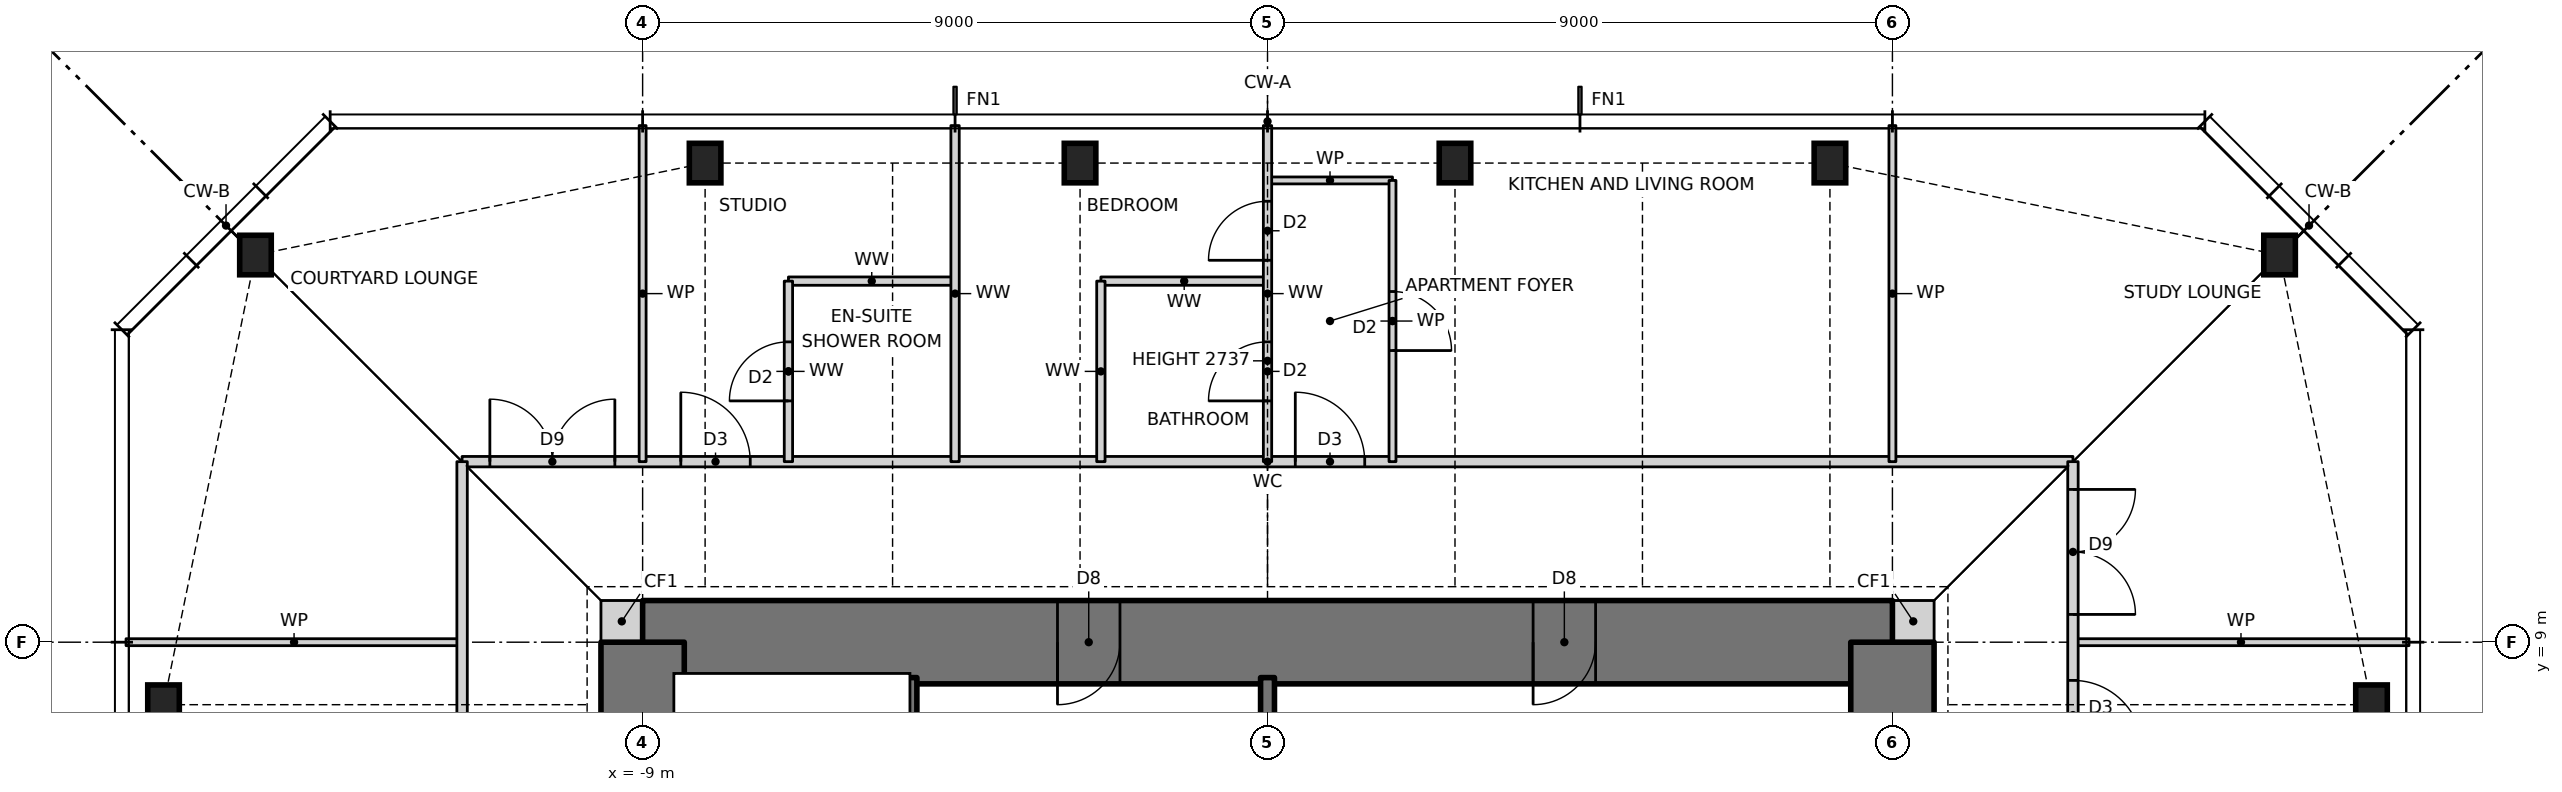
"""IFC4 building model, lengths in metres.
Left out: names, types, materials, properties, quantities, classifications, styles, units other than length and angle.
Written with IfcOpenShell. Run it as: python <this file> out.ifc"""

import sys

from ifc_helpers import new_model, si_unit, direction, frame, frame_2d, origin, origin_2d, place, context, subcontext, project, spatial, rectangle, i_section, extrude, element, fill, save


model = new_model("IFC4")
c1 = context("Model", 3, precision=1e-05, world=origin(), true_north=direction((0.0, 1.0)))
c2 = subcontext(c1, "Body", "Model", "MODEL_VIEW")
j1 = project(units=[si_unit("LENGTHUNIT", "METRE"), si_unit("PLANEANGLEUNIT", "RADIAN")], contexts=[c1])
p1 = place(None, origin())
s1 = spatial("IfcSite", under=j1, at=p1, CompositionType="ELEMENT")
p2 = place(p1, origin())
s2 = spatial("IfcBuilding", under=s1, at=p2, CompositionType="ELEMENT")
p3 = place(p2, frame((0.0, 0.0, 232.5)))
s3 = spatial("IfcBuildingStorey", under=s2, at=p3, CompositionType="ELEMENT", Elevation=232.5)
for number, where, z_axis, x_axis in (
    (1, (15.9, 8.1, 0.0), (0.0, 0.0, 1.0), (1.0, 0.0, 0.0)),
    (2, (14.576, 14.576, 0.0), (0.0, 0.0, 1.0), (1.0, 0.0, 0.0)),
    (3, (8.1, 15.9, 0.0), (0.0, 0.0, 1.0), (1.0, 0.0, 0.0)),
    (4, (2.7, 15.9, 0.0), (0.0, 0.0, 1.0), (1.0, 0.0, 0.0)),
    (5, (-2.7, 15.9, 0.0), (0.0, 0.0, 1.0), (1.0, 0.0, 0.0)),
    (6, (-8.1, 15.9, 0.0), (0.0, 0.0, 1.0), (1.0, 0.0, 0.0)),
    (7, (-14.576, 14.576, 0.0), (0.0, 0.0, 1.0), (1.0, 0.0, 0.0)),
    (8, (-15.9, 8.1, 0.0), (0.0, 0.0, 1.0), (1.0, 0.0, 0.0)),
):
    element("IfcColumn", number, at=place(p3, frame(where, z_axis=z_axis, x_axis=x_axis)), inside=s3, PredefinedType="COLUMN", context=c2, shape_type="SweptSolid", body=[
        extrude(i_section(OverallWidth=0.455, OverallDepth=0.569, WebThickness=0.078, FlangeThickness=0.125, at=origin_2d()), origin(), (0.0, 0.0, 1.0), 3.5),
    ])
for number, where, z_axis, x_axis in (
    (9, (9.0, 9.3, 0.0), (0.0, 0.0, 1.0), (1.0, 0.0, 0.0)),
    (10, (-9.6, 9.3, 0.0), (0.0, 0.0, 1.0), (1.0, 0.0, 0.0)),
):
    element("IfcWall", number, at=place(p3, frame(where, z_axis=z_axis, x_axis=x_axis)), inside=s3, PredefinedType="SOLIDWALL", context=c2, shape_type="SweptSolid", body=[
        extrude(rectangle(XDim=0.6, YDim=0.6, at=frame_2d((0.3, 0.0))), origin(), (0.0, 0.0, 1.0), 3.5),
    ])
p4 = place(p3, frame((9.0, 9.0, 0.0), z_axis=(0.0, 0.0, 1.0), x_axis=(-1.0, 0.0, 0.0)))
e11 = element("IfcWall", 11, at=p4, inside=s3, PredefinedType="SHEAR", context=c2, shape_type="SweptSolid", body=[
    extrude(rectangle(XDim=18.0, YDim=1.2, at=frame_2d((9.0, 0.0))), origin(), (0.0, 0.0, 1.0), 3.5),
])
p5 = place(p4, frame((11.125, 0.0, 0.0)))
e12 = element("IfcOpeningElement", 12, at=p5, cuts=e11, PredefinedType="OPENING", context=c2, shape_type="SweptSolid", body=[
    extrude(rectangle(XDim=0.9, YDim=2.1, at=frame_2d((0.45, 1.05))), frame((0.0, 0.61, 0.0), z_axis=(0.0, -1.0, 0.0), x_axis=(1.0, 0.0, 0.0)), (0.0, 0.0, 1.0), 1.22),
])
p6 = place(p4, frame((4.275, 0.0, 0.0)))
e13 = element("IfcOpeningElement", 13, at=p6, cuts=e11, PredefinedType="OPENING", context=c2, shape_type="SweptSolid", body=[
    extrude(rectangle(XDim=0.9, YDim=2.1, at=frame_2d((0.45, 1.05))), frame((0.0, 0.61, 0.0), z_axis=(0.0, -1.0, 0.0), x_axis=(1.0, 0.0, 0.0)), (0.0, 0.0, 1.0), 1.22),
])
p7 = place(p3, frame((9.0, -9.0, 0.0), z_axis=(0.0, 0.0, 1.0), x_axis=(0.0, 1.0, 0.0)))
e14 = element("IfcWall", 14, at=p7, inside=s3, PredefinedType="SHEAR", context=c2, shape_type="SweptSolid", body=[
    extrude(rectangle(XDim=18.0, YDim=1.2, at=frame_2d((9.0, 0.0))), origin(), (0.0, 0.0, 1.0), 3.5),
])
p8 = place(p7, frame((8.5, 0.0, 0.0)))
e15 = element("IfcOpeningElement", 15, at=p8, cuts=e14, PredefinedType="OPENING", context=c2, shape_type="SweptSolid", body=[
    extrude(rectangle(XDim=1.0, YDim=2.1, at=frame_2d((0.5, 1.05))), frame((0.0, 0.61, 0.0), z_axis=(0.0, -1.0, 0.0), x_axis=(1.0, 0.0, 0.0)), (0.0, 0.0, 1.0), 1.22),
])
p9 = place(p3, frame((-9.0, 9.0, 0.0), z_axis=(0.0, 0.0, 1.0), x_axis=(0.0, -1.0, 0.0)))
e16 = element("IfcWall", 16, at=p9, inside=s3, PredefinedType="SHEAR", context=c2, shape_type="SweptSolid", body=[
    extrude(rectangle(XDim=18.0, YDim=1.2, at=frame_2d((9.0, 0.0))), origin(), (0.0, 0.0, 1.0), 3.5),
])
p10 = place(p9, frame((8.5, 0.0, 0.0)))
e17 = element("IfcOpeningElement", 17, at=p10, cuts=e16, PredefinedType="OPENING", context=c2, shape_type="SweptSolid", body=[
    extrude(rectangle(XDim=1.0, YDim=2.1, at=frame_2d((0.5, 1.05))), frame((0.0, 0.61, 0.0), z_axis=(0.0, -1.0, 0.0), x_axis=(1.0, 0.0, 0.0)), (0.0, 0.0, 1.0), 1.22),
])
for number, where, z_axis, x_axis in (
    (18, (-16.44, 9.0, 0.0), (0.0, 0.0, 1.0), (1.0, 0.0, 0.0)),
    (19, (11.6, 9.0, 0.0), (0.0, 0.0, 1.0), (1.0, 0.0, 0.0)),
):
    element("IfcWall", number, at=place(p3, frame(where, z_axis=z_axis, x_axis=x_axis)), inside=s3, PredefinedType="PARTITIONING", context=c2, shape_type="SweptSolid", body=[
        extrude(rectangle(XDim=4.84, YDim=0.1, at=frame_2d((2.42, 0.0))), origin(), (0.0, 0.0, 1.0), 3.27),
    ])
p11 = place(p3, frame((-11.6, 11.6, 0.0), z_axis=(0.0, 0.0, 1.0), x_axis=(1.0, 0.0, 0.0)))
e20 = element("IfcWall", 20, at=p11, inside=s3, PredefinedType="PARTITIONING", context=c2, shape_type="SweptSolid", body=[
    extrude(rectangle(XDim=23.2, YDim=0.15, at=frame_2d((11.6, 0.0))), origin(), (0.0, 0.0, 1.0), 3.27),
])
p12 = place(p11, frame((12.0, 0.0, 0.0)))
e21 = element("IfcOpeningElement", 21, at=p12, cuts=e20, PredefinedType="OPENING", context=c2, shape_type="SweptSolid", body=[
    extrude(rectangle(XDim=1.0, YDim=2.1, at=frame_2d((0.5, 1.05))), frame((0.0, 0.085, 0.0), z_axis=(0.0, -1.0, 0.0), x_axis=(1.0, 0.0, 0.0)), (0.0, 0.0, 1.0), 0.17),
])
p13 = place(p11, frame((3.15, 0.0, 0.0)))
e22 = element("IfcOpeningElement", 22, at=p13, cuts=e20, PredefinedType="OPENING", context=c2, shape_type="SweptSolid", body=[
    extrude(rectangle(XDim=1.0, YDim=2.1, at=frame_2d((0.5, 1.05))), frame((0.0, 0.085, 0.0), z_axis=(0.0, -1.0, 0.0), x_axis=(1.0, 0.0, 0.0)), (0.0, 0.0, 1.0), 0.17),
])
p14 = place(p11, frame((0.4, 0.0, 0.0)))
e23 = element("IfcOpeningElement", 23, at=p14, cuts=e20, PredefinedType="OPENING", context=c2, shape_type="SweptSolid", body=[
    extrude(rectangle(XDim=1.8, YDim=2.1, at=frame_2d((0.9, 1.05))), frame((0.0, 0.085, 0.0), z_axis=(0.0, -1.0, 0.0), x_axis=(1.0, 0.0, 0.0)), (0.0, 0.0, 1.0), 0.17),
])
for number, where, z_axis, x_axis in (
    (24, (-6.9, 14.2, 0.0), (0.0, 0.0, 1.0), (1.0, 0.0, 0.0)),
    (25, (-2.4, 14.2, 0.0), (0.0, 0.0, 1.0), (1.0, 0.0, 0.0)),
):
    element("IfcWall", number, at=place(p3, frame(where, z_axis=z_axis, x_axis=x_axis)), inside=s3, PredefinedType="PARTITIONING", context=c2, shape_type="SweptSolid", body=[
        extrude(rectangle(XDim=2.4, YDim=0.12, at=frame_2d((1.2, 0.0))), origin(), (0.0, 0.0, 1.0), 3.27),
    ])
p15 = place(p3, frame((0.0, 15.65, 0.0), z_axis=(0.0, 0.0, 1.0), x_axis=(1.0, 0.0, 0.0)))
e26 = element("IfcWall", 26, at=p15, inside=s3, PredefinedType="PARTITIONING", context=c2, shape_type="SweptSolid", body=[
    extrude(rectangle(XDim=1.8, YDim=0.1, at=frame_2d((0.9, 0.0))), origin(), (0.0, 0.0, 1.0), 3.27),
])
p16 = place(p3, frame((11.6, -12.1, 0.0), z_axis=(0.0, 0.0, 1.0), x_axis=(0.0, 1.0, 0.0)))
e27 = element("IfcWall", 27, at=p16, inside=s3, PredefinedType="PARTITIONING", context=c2, shape_type="SweptSolid", body=[
    extrude(rectangle(XDim=23.7, YDim=0.15, at=frame_2d((11.85, 0.0))), origin(), (0.0, 0.0, 1.0), 3.27),
])
p17 = place(p16, frame((10.7, 0.0, 0.0)))
e28 = element("IfcOpeningElement", 28, at=p17, cuts=e27, PredefinedType="OPENING", context=c2, shape_type="SweptSolid", body=[
    extrude(rectangle(XDim=1.0, YDim=2.1, at=frame_2d((0.5, 1.05))), frame((0.0, 0.085, 0.0), z_axis=(0.0, -1.0, 0.0), x_axis=(1.0, 0.0, 0.0)), (0.0, 0.0, 1.0), 0.17),
])
p18 = place(p16, frame((19.55, 0.0, 0.0)))
e29 = element("IfcOpeningElement", 29, at=p18, cuts=e27, PredefinedType="OPENING", context=c2, shape_type="SweptSolid", body=[
    extrude(rectangle(XDim=1.0, YDim=2.1, at=frame_2d((0.5, 1.05))), frame((0.0, 0.085, 0.0), z_axis=(0.0, -1.0, 0.0), x_axis=(1.0, 0.0, 0.0)), (0.0, 0.0, 1.0), 0.17),
])
p19 = place(p16, frame((21.5, 0.0, 0.0)))
e30 = element("IfcOpeningElement", 30, at=p19, cuts=e27, PredefinedType="OPENING", context=c2, shape_type="SweptSolid", body=[
    extrude(rectangle(XDim=1.8, YDim=2.1, at=frame_2d((0.9, 1.05))), frame((0.0, 0.085, 0.0), z_axis=(0.0, -1.0, 0.0), x_axis=(1.0, 0.0, 0.0)), (0.0, 0.0, 1.0), 0.17),
])
p20 = place(p16, frame((0.65, 0.0, 0.0)))
e31 = element("IfcOpeningElement", 31, at=p20, cuts=e27, PredefinedType="OPENING", context=c2, shape_type="SweptSolid", body=[
    extrude(rectangle(XDim=1.8, YDim=2.1, at=frame_2d((0.9, 1.05))), frame((0.0, 0.085, 0.0), z_axis=(0.0, -1.0, 0.0), x_axis=(1.0, 0.0, 0.0)), (0.0, 0.0, 1.0), 0.17),
])
p21 = place(p3, frame((9.0, 11.6, 0.0), z_axis=(0.0, 0.0, 1.0), x_axis=(0.0, 1.0, 0.0)))
e32 = element("IfcWall", 32, at=p21, inside=s3, PredefinedType="PARTITIONING", context=c2, shape_type="SweptSolid", body=[
    extrude(rectangle(XDim=4.84, YDim=0.1, at=frame_2d((2.42, 0.0))), origin(), (0.0, 0.0, 1.0), 3.27),
])
p22 = place(p3, frame((1.8, 11.6, 0.0), z_axis=(0.0, 0.0, 1.0), x_axis=(0.0, 1.0, 0.0)))
e33 = element("IfcWall", 33, at=p22, inside=s3, PredefinedType="PARTITIONING", context=c2, shape_type="SweptSolid", body=[
    extrude(rectangle(XDim=4.05, YDim=0.1, at=frame_2d((2.025, 0.0))), origin(), (0.0, 0.0, 1.0), 3.27),
])
p23 = place(p22, frame((1.6, 0.0, 0.0)))
e34 = element("IfcOpeningElement", 34, at=p23, cuts=e33, PredefinedType="OPENING", context=c2, shape_type="SweptSolid", body=[
    extrude(rectangle(XDim=0.85, YDim=2.1, at=frame_2d((0.425, 1.05))), frame((0.0, 0.06, 0.0), z_axis=(0.0, -1.0, 0.0), x_axis=(1.0, 0.0, 0.0)), (0.0, 0.0, 1.0), 0.12),
])
p24 = place(p3, frame((0.0, 4.4, 0.0), z_axis=(0.0, 0.0, 1.0), x_axis=(0.0, 1.0, 0.0)))
e35 = element("IfcWall", 35, at=p24, inside=s3, PredefinedType="SOLIDWALL", context=c2, shape_type="SweptSolid", body=[
    extrude(rectangle(XDim=4.09, YDim=0.2, at=frame_2d((2.045, 0.0))), origin(), (0.0, 0.0, 1.0), 3.5),
])
p25 = place(p3, frame((0.0, 11.6, 0.0), z_axis=(0.0, 0.0, 1.0), x_axis=(0.0, 1.0, 0.0)))
e36 = element("IfcWall", 36, at=p25, inside=s3, PredefinedType="PARTITIONING", context=c2, shape_type="SweptSolid", body=[
    extrude(rectangle(XDim=4.84, YDim=0.12, at=frame_2d((2.42, 0.0))), origin(), (0.0, 0.0, 1.0), 2.737),
])
p26 = place(p25, frame((2.9, 0.0, 0.0)))
e37 = element("IfcOpeningElement", 37, at=p26, cuts=e36, PredefinedType="OPENING", context=c2, shape_type="SweptSolid", body=[
    extrude(rectangle(XDim=0.85, YDim=2.1, at=frame_2d((0.425, 1.05))), frame((0.0, 0.07, 0.0), z_axis=(0.0, -1.0, 0.0), x_axis=(1.0, 0.0, 0.0)), (0.0, 0.0, 1.0), 0.14),
])
p27 = place(p25, frame((0.875, 0.0, 0.0)))
e38 = element("IfcOpeningElement", 38, at=p27, cuts=e36, PredefinedType="OPENING", context=c2, shape_type="SweptSolid", body=[
    extrude(rectangle(XDim=0.85, YDim=2.1, at=frame_2d((0.425, 1.05))), frame((0.0, 0.07, 0.0), z_axis=(0.0, -1.0, 0.0), x_axis=(1.0, 0.0, 0.0)), (0.0, 0.0, 1.0), 0.14),
])
p28 = place(p3, frame((-2.4, 11.6, 0.0), z_axis=(0.0, 0.0, 1.0), x_axis=(0.0, 1.0, 0.0)))
e39 = element("IfcWall", 39, at=p28, inside=s3, PredefinedType="PARTITIONING", context=c2, shape_type="SweptSolid", body=[
    extrude(rectangle(XDim=2.6, YDim=0.12, at=frame_2d((1.3, 0.0))), origin(), (0.0, 0.0, 1.0), 3.27),
])
p29 = place(p3, frame((-4.5, 11.6, 0.0), z_axis=(0.0, 0.0, 1.0), x_axis=(0.0, 1.0, 0.0)))
e40 = element("IfcWall", 40, at=p29, inside=s3, PredefinedType="PARTITIONING", context=c2, shape_type="SweptSolid", body=[
    extrude(rectangle(XDim=4.84, YDim=0.12, at=frame_2d((2.42, 0.0))), origin(), (0.0, 0.0, 1.0), 3.27),
])
p30 = place(p3, frame((-5.15, 1.6, 0.0), z_axis=(0.0, 0.0, 1.0), x_axis=(0.0, 1.0, 0.0)))
e41 = element("IfcWall", 41, at=p30, inside=s3, PredefinedType="SOLIDWALL", context=c2, shape_type="SweptSolid", body=[
    extrude(rectangle(XDim=6.89, YDim=0.2, at=frame_2d((3.445, 0.0))), origin(), (0.0, 0.0, 1.0), 3.5),
])
p31 = place(p3, frame((-6.9, 11.6, 0.0), z_axis=(0.0, 0.0, 1.0), x_axis=(0.0, 1.0, 0.0)))
e42 = element("IfcWall", 42, at=p31, inside=s3, PredefinedType="PARTITIONING", context=c2, shape_type="SweptSolid", body=[
    extrude(rectangle(XDim=2.6, YDim=0.12, at=frame_2d((1.3, 0.0))), origin(), (0.0, 0.0, 1.0), 3.27),
])
p32 = place(p31, frame((0.875, 0.0, 0.0)))
e43 = element("IfcOpeningElement", 43, at=p32, cuts=e42, PredefinedType="OPENING", context=c2, shape_type="SweptSolid", body=[
    extrude(rectangle(XDim=0.85, YDim=2.1, at=frame_2d((0.425, 1.05))), frame((0.0, 0.07, 0.0), z_axis=(0.0, -1.0, 0.0), x_axis=(1.0, 0.0, 0.0)), (0.0, 0.0, 1.0), 0.14),
])
p33 = place(p3, frame((-9.0, 11.6, 0.0), z_axis=(0.0, 0.0, 1.0), x_axis=(0.0, 1.0, 0.0)))
e44 = element("IfcWall", 44, at=p33, inside=s3, PredefinedType="PARTITIONING", context=c2, shape_type="SweptSolid", body=[
    extrude(rectangle(XDim=4.84, YDim=0.1, at=frame_2d((2.42, 0.0))), origin(), (0.0, 0.0, 1.0), 3.27),
])
p34 = place(p3, frame((-11.6, -12.1, 0.0), z_axis=(0.0, 0.0, 1.0), x_axis=(0.0, 1.0, 0.0)))
e45 = element("IfcWall", 45, at=p34, inside=s3, PredefinedType="PARTITIONING", context=c2, shape_type="SweptSolid", body=[
    extrude(rectangle(XDim=23.7, YDim=0.15, at=frame_2d((11.85, 0.0))), origin(), (0.0, 0.0, 1.0), 3.27),
])
p35 = place(p34, frame((12.5, 0.0, 0.0)))
e46 = element("IfcOpeningElement", 46, at=p35, cuts=e45, PredefinedType="OPENING", context=c2, shape_type="SweptSolid", body=[
    extrude(rectangle(XDim=1.0, YDim=2.1, at=frame_2d((0.5, 1.05))), frame((0.0, 0.085, 0.0), z_axis=(0.0, -1.0, 0.0), x_axis=(1.0, 0.0, 0.0)), (0.0, 0.0, 1.0), 0.17),
])
p36 = place(p34, frame((3.65, 0.0, 0.0)))
e47 = element("IfcOpeningElement", 47, at=p36, cuts=e45, PredefinedType="OPENING", context=c2, shape_type="SweptSolid", body=[
    extrude(rectangle(XDim=1.0, YDim=2.1, at=frame_2d((0.5, 1.05))), frame((0.0, 0.085, 0.0), z_axis=(0.0, -1.0, 0.0), x_axis=(1.0, 0.0, 0.0)), (0.0, 0.0, 1.0), 0.17),
])
p37 = place(p34, frame((1.125, 0.0, 0.0)))
e48 = element("IfcOpeningElement", 48, at=p37, cuts=e45, PredefinedType="OPENING", context=c2, shape_type="SweptSolid", body=[
    extrude(rectangle(XDim=0.85, YDim=2.1, at=frame_2d((0.425, 1.05))), frame((0.0, 0.085, 0.0), z_axis=(0.0, -1.0, 0.0), x_axis=(1.0, 0.0, 0.0)), (0.0, 0.0, 1.0), 0.17),
])
p38 = place(p18, frame((1.0, 0.0, 0.0), z_axis=(0.0, 0.0, 1.0), x_axis=(-1.0, 0.0, 0.0)))
e49 = element("IfcDoor", 49, at=p38, inside=s3, OperationType="SINGLE_SWING_RIGHT", PredefinedType="DOOR", context=c2, shape_type="SweptSolid", body=[
    extrude(rectangle(XDim=1.0, YDim=2.1, at=frame_2d((0.5, 1.05))), frame((0.0, 0.025, 0.0), z_axis=(0.0, -1.0, 0.0), x_axis=(1.0, 0.0, 0.0)), (0.0, 0.0, 1.0), 0.05),
])
fill(e29, e49)
p39 = place(p12, origin())
e50 = element("IfcDoor", 50, at=p39, inside=s3, OperationType="SINGLE_SWING_LEFT", PredefinedType="DOOR", context=c2, shape_type="SweptSolid", body=[
    extrude(rectangle(XDim=1.0, YDim=2.1, at=frame_2d((0.5, 1.05))), frame((0.0, 0.025, 0.0), z_axis=(0.0, -1.0, 0.0), x_axis=(1.0, 0.0, 0.0)), (0.0, 0.0, 1.0), 0.05),
])
fill(e21, e50)
p40 = place(p23, frame((0.85, 0.0, 0.0), z_axis=(0.0, 0.0, 1.0), x_axis=(-1.0, 0.0, 0.0)))
e51 = element("IfcDoor", 51, at=p40, inside=s3, OperationType="SINGLE_SWING_RIGHT", PredefinedType="DOOR", context=c2, shape_type="SweptSolid", body=[
    extrude(rectangle(XDim=0.85, YDim=2.1, at=frame_2d((0.425, 1.05))), frame((0.0, 0.025, 0.0), z_axis=(0.0, -1.0, 0.0), x_axis=(1.0, 0.0, 0.0)), (0.0, 0.0, 1.0), 0.05),
])
fill(e34, e51)
p41 = place(p26, origin())
e52 = element("IfcDoor", 52, at=p41, inside=s3, OperationType="SINGLE_SWING_LEFT", PredefinedType="DOOR", context=c2, shape_type="SweptSolid", body=[
    extrude(rectangle(XDim=0.85, YDim=2.1, at=frame_2d((0.425, 1.05))), frame((0.0, 0.025, 0.0), z_axis=(0.0, -1.0, 0.0), x_axis=(1.0, 0.0, 0.0)), (0.0, 0.0, 1.0), 0.05),
])
fill(e37, e52)
p42 = place(p27, origin())
e53 = element("IfcDoor", 53, at=p42, inside=s3, OperationType="SINGLE_SWING_LEFT", PredefinedType="DOOR", context=c2, shape_type="SweptSolid", body=[
    extrude(rectangle(XDim=0.85, YDim=2.1, at=frame_2d((0.425, 1.05))), frame((0.0, 0.025, 0.0), z_axis=(0.0, -1.0, 0.0), x_axis=(1.0, 0.0, 0.0)), (0.0, 0.0, 1.0), 0.05),
])
fill(e38, e53)
p43 = place(p13, origin())
e54 = element("IfcDoor", 54, at=p43, inside=s3, OperationType="SINGLE_SWING_LEFT", PredefinedType="DOOR", context=c2, shape_type="SweptSolid", body=[
    extrude(rectangle(XDim=1.0, YDim=2.1, at=frame_2d((0.5, 1.05))), frame((0.0, 0.025, 0.0), z_axis=(0.0, -1.0, 0.0), x_axis=(1.0, 0.0, 0.0)), (0.0, 0.0, 1.0), 0.05),
])
fill(e22, e54)
p44 = place(p32, origin())
e55 = element("IfcDoor", 55, at=p44, inside=s3, OperationType="SINGLE_SWING_LEFT", PredefinedType="DOOR", context=c2, shape_type="SweptSolid", body=[
    extrude(rectangle(XDim=0.85, YDim=2.1, at=frame_2d((0.425, 1.05))), frame((0.0, 0.025, 0.0), z_axis=(0.0, -1.0, 0.0), x_axis=(1.0, 0.0, 0.0)), (0.0, 0.0, 1.0), 0.05),
])
fill(e43, e55)
p45 = place(p19, frame((1.8, 0.0, 0.0), z_axis=(0.0, 0.0, 1.0), x_axis=(-1.0, 0.0, 0.0)))
e56 = element("IfcDoor", 56, at=p45, inside=s3, OperationType="DOUBLE_DOOR_SINGLE_SWING", PredefinedType="DOOR", context=c2, shape_type="SweptSolid", body=[
    extrude(rectangle(XDim=1.8, YDim=2.1, at=frame_2d((0.9, 1.05))), frame((0.0, 0.025, 0.0), z_axis=(0.0, -1.0, 0.0), x_axis=(1.0, 0.0, 0.0)), (0.0, 0.0, 1.0), 0.05),
])
fill(e30, e56)
p46 = place(p14, origin())
e57 = element("IfcDoor", 57, at=p46, inside=s3, OperationType="DOUBLE_DOOR_SINGLE_SWING", PredefinedType="DOOR", context=c2, shape_type="SweptSolid", body=[
    extrude(rectangle(XDim=1.8, YDim=2.1, at=frame_2d((0.9, 1.05))), frame((0.0, 0.025, 0.0), z_axis=(0.0, -1.0, 0.0), x_axis=(1.0, 0.0, 0.0)), (0.0, 0.0, 1.0), 0.05),
])
fill(e23, e57)
p47 = place(p5, origin())
e58 = element("IfcDoor", 58, at=p47, inside=s3, OperationType="SINGLE_SWING_RIGHT", PredefinedType="DOOR", context=c2, shape_type="SweptSolid", body=[
    extrude(rectangle(XDim=0.9, YDim=2.1, at=frame_2d((0.45, 1.05))), frame((0.0, 0.025, 0.0), z_axis=(0.0, -1.0, 0.0), x_axis=(1.0, 0.0, 0.0)), (0.0, 0.0, 1.0), 0.05),
])
fill(e12, e58)
p48 = place(p6, origin())
e59 = element("IfcDoor", 59, at=p48, inside=s3, OperationType="SINGLE_SWING_RIGHT", PredefinedType="DOOR", context=c2, shape_type="SweptSolid", body=[
    extrude(rectangle(XDim=0.9, YDim=2.1, at=frame_2d((0.45, 1.05))), frame((0.0, 0.025, 0.0), z_axis=(0.0, -1.0, 0.0), x_axis=(1.0, 0.0, 0.0)), (0.0, 0.0, 1.0), 0.05),
])
fill(e13, e59)
save(model, sys.argv[1])
